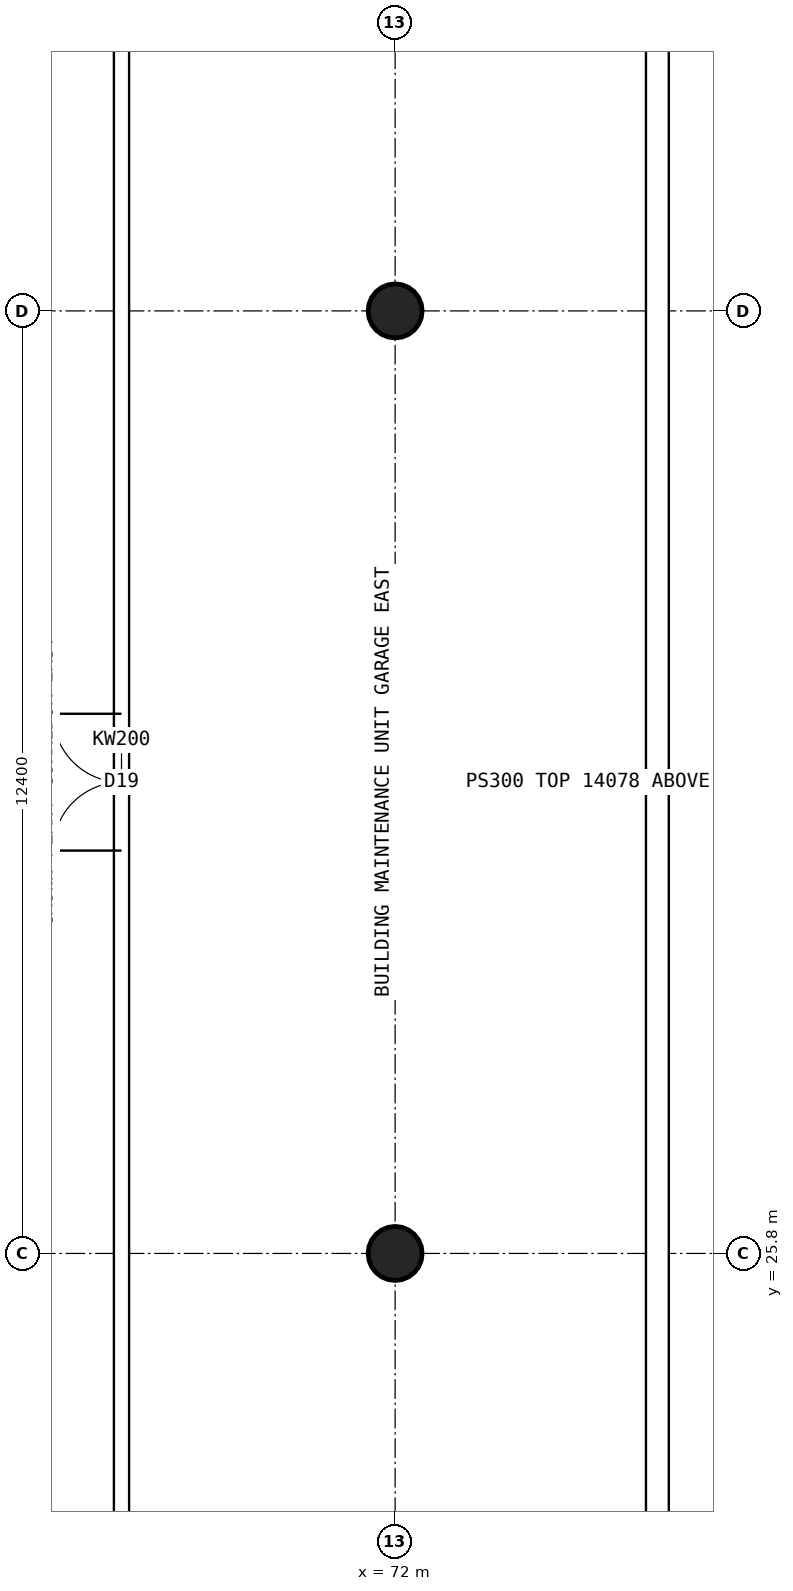
"""IFC4 building model, lengths in metres.
Left out: names, types, materials, properties, quantities, classifications, styles, units other than length and angle.
Written with IfcOpenShell. Run it as: python <this file> out.ifc"""

import sys

from ifc_helpers import new_model, si_unit, direction, frame, frame_2d, origin, origin_2d, place, context, subcontext, project, spatial, polyline, rectangle, hollow_circle, outline, extrude, clip, halfspace, element, fill, save


model = new_model("IFC4")
c1 = context("Model", 3, precision=1e-05, world=origin(), true_north=direction((0.0, 1.0)))
c2 = subcontext(c1, "Body", "Model", "MODEL_VIEW")
j1 = project(units=[si_unit("LENGTHUNIT", "METRE"), si_unit("PLANEANGLEUNIT", "RADIAN")], contexts=[c1])
p1 = place(None, origin())
s1 = spatial("IfcSite", under=j1, at=p1, CompositionType="ELEMENT")
p2 = place(p1, origin())
s2 = spatial("IfcBuilding", under=s1, at=p2, CompositionType="ELEMENT")
p3 = place(p2, frame((0.0, 0.0, 262.3)))
s3 = spatial("IfcBuildingStorey", under=s2, at=p3, CompositionType="ELEMENT", Elevation=262.3)
p4 = place(p3, frame((72.0, 25.8, 0.0), z_axis=(0.0, 0.0, 1.0), x_axis=(1.0, 0.0, 0.0)))
e1 = element("IfcColumn", 1, at=p4, inside=s3, PredefinedType="COLUMN", context=c2, shape_type="SweptSolid", body=[
    extrude(hollow_circle(Radius=0.355, WallThickness=0.025, at=origin_2d()), origin(), (0.0, 0.0, 1.0), 8.433),
])
p5 = place(p3, frame((72.0, 38.2, 0.0), z_axis=(0.0, 0.0, 1.0), x_axis=(1.0, 0.0, 0.0)))
e2 = element("IfcColumn", 2, at=p5, inside=s3, PredefinedType="COLUMN", context=c2, shape_type="SweptSolid", body=[
    extrude(hollow_circle(Radius=0.355, WallThickness=0.025, at=origin_2d()), origin(), (0.0, 0.0, 1.0), 11.524),
])
p6 = place(p3, frame((75.45, 19.8, 0.0), z_axis=(0.0, 0.0, 1.0), x_axis=(0.0, 1.0, 0.0)))
e3 = element("IfcWall", 3, at=p6, inside=s3, PredefinedType="SOLIDWALL", context=c2, shape_type="Clipping", body=[
    clip(clip(extrude(outline(polyline([(-0.025, 0.0), (24.425, 0.0), (24.425, 14.084), (-0.025, 7.988), (-0.025, 0.0)])), frame((0.0, 0.15, 0.0), z_axis=(0.0, -1.0, 0.0), x_axis=(1.0, 0.0, 0.0)), (0.0, 0.0, 1.0), 0.3), halfspace(frame((0.0, 0.0, 0.0), z_axis=(-0.995184726707, 0.098017139978, 0.0)), False)), halfspace(frame((24.4, 0.0, 0.0), z_axis=(0.995184726707, 0.098017139978, 0.0)), False)),
])
p7 = place(p3, frame((68.4, 18.0, 0.0), z_axis=(0.0, 0.0, 1.0), x_axis=(0.0, 1.0, 0.0)))
e4 = element("IfcWall", 4, at=p7, inside=s3, PredefinedType="SOLIDWALL", context=c2, shape_type="SweptSolid", body=[
    extrude(rectangle(XDim=28.0, YDim=0.2, at=frame_2d((14.0, 0.0))), origin(), (0.0, 0.0, 1.0), 6.0),
])
p8 = place(p7, frame((13.1, 0.0, 0.0)))
e5 = element("IfcOpeningElement", 5, at=p8, cuts=e4, PredefinedType="OPENING", context=c2, shape_type="SweptSolid", body=[
    extrude(rectangle(XDim=1.8, YDim=2.1, at=frame_2d((0.9, 1.05))), frame((0.0, 0.11, 0.0), z_axis=(0.0, -1.0, 0.0), x_axis=(1.0, 0.0, 0.0)), (0.0, 0.0, 1.0), 0.22),
])
p9 = place(p7, frame((26.2, 0.0, 0.0)))
e6 = element("IfcOpeningElement", 6, at=p9, cuts=e4, PredefinedType="OPENING", context=c2, shape_type="SweptSolid", body=[
    extrude(rectangle(XDim=1.2, YDim=2.1, at=frame_2d((0.6, 1.05))), frame((0.0, 0.11, 0.0), z_axis=(0.0, -1.0, 0.0), x_axis=(1.0, 0.0, 0.0)), (0.0, 0.0, 1.0), 0.22),
])
p10 = place(p7, frame((0.6, 0.0, 0.0)))
e7 = element("IfcOpeningElement", 7, at=p10, cuts=e4, PredefinedType="OPENING", context=c2, shape_type="SweptSolid", body=[
    extrude(rectangle(XDim=1.2, YDim=2.1, at=frame_2d((0.6, 1.05))), frame((0.0, 0.11, 0.0), z_axis=(0.0, -1.0, 0.0), x_axis=(1.0, 0.0, 0.0)), (0.0, 0.0, 1.0), 0.22),
])
p11 = place(p8, origin())
e8 = element("IfcDoor", 8, at=p11, inside=s3, OperationType="DOUBLE_DOOR_SINGLE_SWING", PredefinedType="DOOR", context=c2, shape_type="SweptSolid", body=[
    extrude(rectangle(XDim=1.8, YDim=2.1, at=frame_2d((0.9, 1.05))), frame((0.0, 0.025, 0.0), z_axis=(0.0, -1.0, 0.0), x_axis=(1.0, 0.0, 0.0)), (0.0, 0.0, 1.0), 0.05),
])
fill(e5, e8)
save(model, sys.argv[1])
